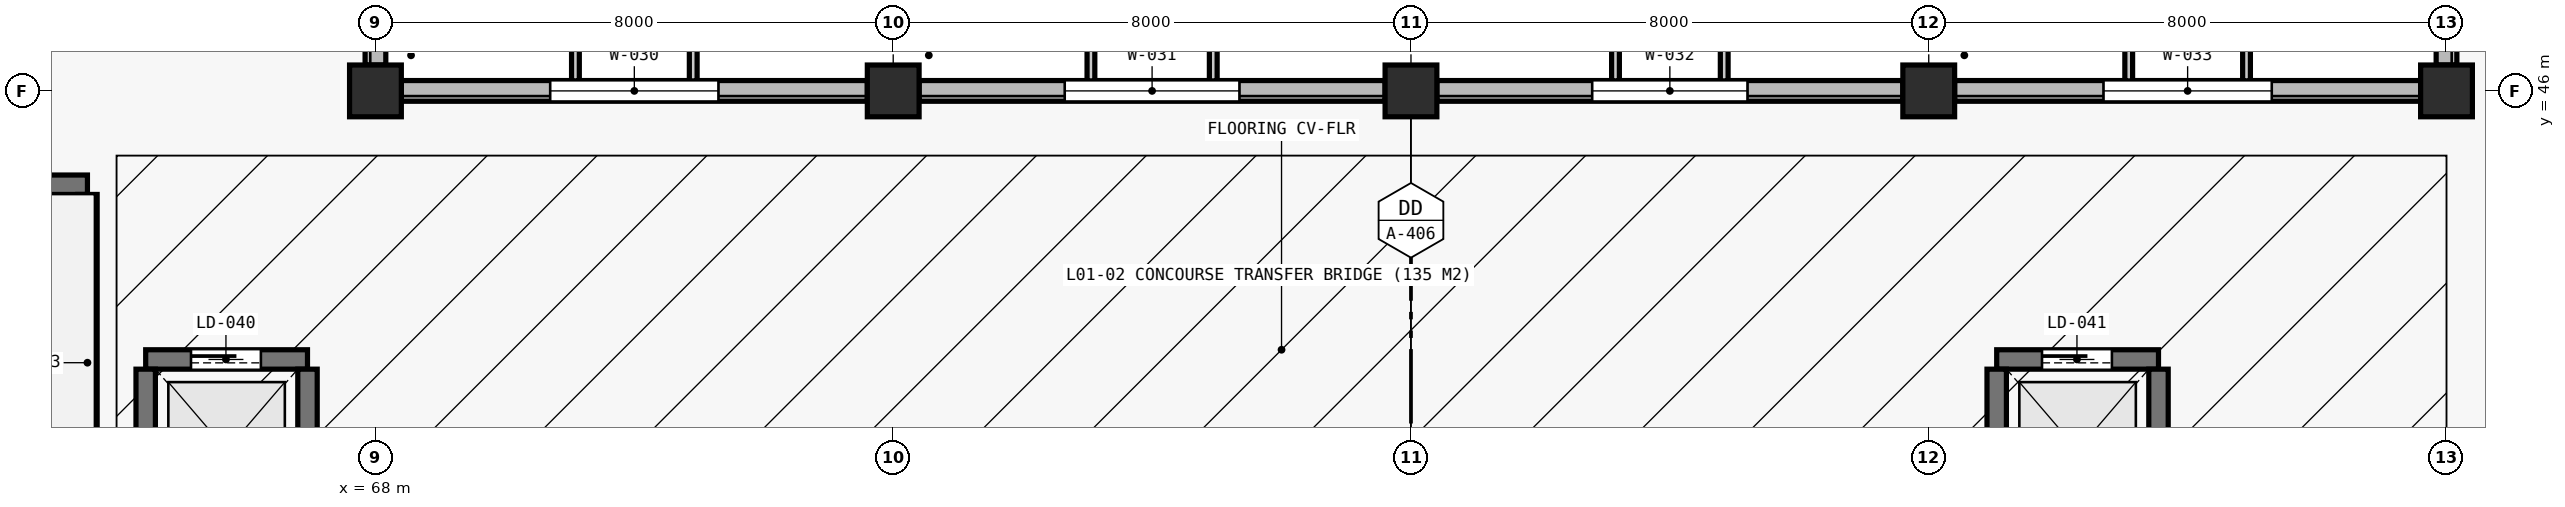
"""IFC4 building model, lengths in metres.
Left out: names, types, materials, properties, quantities, classifications, styles, units other than length and angle.
Written with IfcOpenShell. Run it as: python <this file> out.ifc"""

import sys

from ifc_helpers import new_model, si_unit, direction, frame, frame_2d, origin, origin_2d, place, context, subcontext, project, spatial, rectangle, extrude, element, fill, save


model = new_model("IFC4")
c1 = context("Model", 3, precision=1e-05, world=origin(), true_north=direction((0.0, 1.0)))
c2 = subcontext(c1, "Body", "Model", "MODEL_VIEW")
j1 = project(units=[si_unit("LENGTHUNIT", "METRE"), si_unit("PLANEANGLEUNIT", "RADIAN")], contexts=[c1])
p1 = place(None, origin())
s1 = spatial("IfcSite", under=j1, at=p1, CompositionType="ELEMENT")
p2 = place(p1, origin())
s2 = spatial("IfcBuilding", under=s1, at=p2, CompositionType="ELEMENT")
p3 = place(p2, frame((0.0, 0.0, 6.3)))
s3 = spatial("IfcBuildingStorey", under=s2, at=p3, CompositionType="ELEMENT", Elevation=6.3)
for number, where, z_axis, x_axis in (
    (1, (68.0, 46.0, 0.0), (0.0, 0.0, 1.0), (1.0, 0.0, 0.0)),
    (2, (76.0, 46.0, 0.0), (0.0, 0.0, 1.0), (1.0, 0.0, 0.0)),
    (3, (84.0, 46.0, 0.0), (0.0, 0.0, 1.0), (1.0, 0.0, 0.0)),
    (4, (92.0, 46.0, 0.0), (0.0, 0.0, 1.0), (1.0, 0.0, 0.0)),
    (5, (100.0, 46.0, 0.0), (0.0, 0.0, 1.0), (1.0, 0.0, 0.0)),
):
    element("IfcColumn", number, at=place(p3, frame(where, z_axis=z_axis, x_axis=x_axis)), inside=s3, PredefinedType="COLUMN", context=c2, shape_type="SweptSolid", body=[
        extrude(rectangle(XDim=0.8, YDim=0.8, at=origin_2d()), origin(), (0.0, 0.0, 1.0), 4.6),
    ])
p4 = place(p3, frame((53.05, 44.55, 0.0), z_axis=(0.0, 0.0, 1.0), x_axis=(1.0, 0.0, 0.0)))
e6 = element("IfcWall", 6, at=p4, inside=s3, PredefinedType="SHEAR", context=c2, shape_type="SweptSolid", body=[
    extrude(rectangle(XDim=10.5, YDim=0.3, at=frame_2d((5.25, 0.0))), origin(), (0.0, 0.0, 1.0), 4.6),
])
p5 = place(p4, frame((0.55, 0.0, 0.0)))
e7 = element("IfcOpeningElement", 7, at=p5, cuts=e6, PredefinedType="OPENING", context=c2, shape_type="SweptSolid", body=[
    extrude(rectangle(XDim=1.2, YDim=2.2, at=frame_2d((0.6, 1.1))), frame((0.0, 0.16, 0.0), z_axis=(0.0, -1.0, 0.0), x_axis=(1.0, 0.0, 0.0)), (0.0, 0.0, 1.0), 0.32),
])
p6 = place(p3, frame((63.55, 39.2, 0.0), z_axis=(0.0, 0.0, 1.0), x_axis=(0.0, 1.0, 0.0)))
e8 = element("IfcWall", 8, at=p6, inside=s3, PredefinedType="SHEAR", context=c2, shape_type="SweptSolid", body=[
    extrude(rectangle(XDim=5.2, YDim=0.3, at=frame_2d((2.6, 0.0))), origin(), (0.0, 0.0, 1.0), 4.6),
])
p7 = place(p3, frame((64.45, 41.85, 0.0), z_axis=(0.0, 0.0, 1.0), x_axis=(1.0, 0.0, 0.0)))
e9 = element("IfcWall", 9, at=p7, inside=s3, PredefinedType="SHEAR", context=c2, shape_type="SweptSolid", body=[
    extrude(rectangle(XDim=2.5, YDim=0.3, at=frame_2d((1.25, 0.0))), origin(), (0.0, 0.0, 1.0), 4.6),
])
p8 = place(p7, frame((0.7, 0.0, 0.0)))
e10 = element("IfcOpeningElement", 10, at=p8, cuts=e9, PredefinedType="OPENING", context=c2, shape_type="SweptSolid", body=[
    extrude(rectangle(XDim=1.08, YDim=2.2, at=frame_2d((0.54, 1.1))), frame((0.0, 0.16, 0.0), z_axis=(0.0, -1.0, 0.0), x_axis=(1.0, 0.0, 0.0)), (0.0, 0.0, 1.0), 0.32),
])
for number, where, z_axis, x_axis in (
    (11, (64.45, 39.2, 0.0), (0.0, 0.0, 1.0), (0.0, 1.0, 0.0)),
    (12, (66.95, 39.2, 0.0), (0.0, 0.0, 1.0), (0.0, 1.0, 0.0)),
):
    element("IfcWall", number, at=place(p3, frame(where, z_axis=z_axis, x_axis=x_axis)), inside=s3, PredefinedType="SHEAR", context=c2, shape_type="SweptSolid", body=[
        extrude(rectangle(XDim=2.5, YDim=0.3, at=frame_2d((1.25, 0.0))), origin(), (0.0, 0.0, 1.0), 4.6),
    ])
p9 = place(p3, frame((93.05, 41.85, 0.0), z_axis=(0.0, 0.0, 1.0), x_axis=(1.0, 0.0, 0.0)))
e13 = element("IfcWall", 13, at=p9, inside=s3, PredefinedType="SHEAR", context=c2, shape_type="SweptSolid", body=[
    extrude(rectangle(XDim=2.5, YDim=0.3, at=frame_2d((1.25, 0.0))), origin(), (0.0, 0.0, 1.0), 4.6),
])
p10 = place(p9, frame((0.7, 0.0, 0.0)))
e14 = element("IfcOpeningElement", 14, at=p10, cuts=e13, PredefinedType="OPENING", context=c2, shape_type="SweptSolid", body=[
    extrude(rectangle(XDim=1.08, YDim=2.2, at=frame_2d((0.54, 1.1))), frame((0.0, 0.16, 0.0), z_axis=(0.0, -1.0, 0.0), x_axis=(1.0, 0.0, 0.0)), (0.0, 0.0, 1.0), 0.32),
])
for number, where, z_axis, x_axis in (
    (15, (93.05, 39.2, 0.0), (0.0, 0.0, 1.0), (0.0, 1.0, 0.0)),
    (16, (95.55, 39.2, 0.0), (0.0, 0.0, 1.0), (0.0, 1.0, 0.0)),
):
    element("IfcWall", number, at=place(p3, frame(where, z_axis=z_axis, x_axis=x_axis)), inside=s3, PredefinedType="SHEAR", context=c2, shape_type="SweptSolid", body=[
        extrude(rectangle(XDim=2.5, YDim=0.3, at=frame_2d((1.25, 0.0))), origin(), (0.0, 0.0, 1.0), 4.6),
    ])
p11 = place(p3, frame((68.0, 53.6, 0.0), z_axis=(0.0, 0.0, 1.0), x_axis=(0.0, -1.0, 0.0)))
e17 = element("IfcWall", 17, at=p11, inside=s3, PredefinedType="STANDARD", context=c2, shape_type="SweptSolid", body=[
    extrude(rectangle(XDim=7.2, YDim=0.32, at=frame_2d((3.6, 0.0))), origin(), (0.0, 0.0, 1.0), 3.85),
])
p12 = place(p11, frame((2.4, 0.0, 0.95)))
e18 = element("IfcOpeningElement", 18, at=p12, cuts=e17, PredefinedType="OPENING", context=c2, shape_type="SweptSolid", body=[
    extrude(rectangle(XDim=2.4, YDim=1.8, at=frame_2d((1.2, 0.9))), frame((0.0, 0.17, 0.0), z_axis=(0.0, -1.0, 0.0), x_axis=(1.0, 0.0, 0.0)), (0.0, 0.0, 1.0), 0.34),
])
p13 = place(p3, frame((68.4, 46.0, 0.0), z_axis=(0.0, 0.0, 1.0), x_axis=(1.0, 0.0, 0.0)))
e19 = element("IfcWall", 19, at=p13, inside=s3, PredefinedType="STANDARD", context=c2, shape_type="SweptSolid", body=[
    extrude(rectangle(XDim=7.2, YDim=0.32, at=frame_2d((3.6, 0.0))), origin(), (0.0, 0.0, 1.0), 3.85),
])
p14 = place(p13, frame((2.3, 0.0, 0.95)))
e20 = element("IfcOpeningElement", 20, at=p14, cuts=e19, PredefinedType="OPENING", context=c2, shape_type="SweptSolid", body=[
    extrude(rectangle(XDim=2.6, YDim=1.4, at=frame_2d((1.3, 0.7))), frame((0.0, 0.17, 0.0), z_axis=(0.0, -1.0, 0.0), x_axis=(1.0, 0.0, 0.0)), (0.0, 0.0, 1.0), 0.34),
])
p15 = place(p3, frame((76.4, 46.0, 0.0), z_axis=(0.0, 0.0, 1.0), x_axis=(1.0, 0.0, 0.0)))
e21 = element("IfcWall", 21, at=p15, inside=s3, PredefinedType="STANDARD", context=c2, shape_type="SweptSolid", body=[
    extrude(rectangle(XDim=7.2, YDim=0.32, at=frame_2d((3.6, 0.0))), origin(), (0.0, 0.0, 1.0), 3.85),
])
p16 = place(p15, frame((2.25, 0.0, 0.95)))
e22 = element("IfcOpeningElement", 22, at=p16, cuts=e21, PredefinedType="OPENING", context=c2, shape_type="SweptSolid", body=[
    extrude(rectangle(XDim=2.7, YDim=1.95, at=frame_2d((1.35, 0.975))), frame((0.0, 0.17, 0.0), z_axis=(0.0, -1.0, 0.0), x_axis=(1.0, 0.0, 0.0)), (0.0, 0.0, 1.0), 0.34),
])
p17 = place(p3, frame((84.4, 46.0, 0.0), z_axis=(0.0, 0.0, 1.0), x_axis=(1.0, 0.0, 0.0)))
e23 = element("IfcWall", 23, at=p17, inside=s3, PredefinedType="STANDARD", context=c2, shape_type="SweptSolid", body=[
    extrude(rectangle(XDim=7.2, YDim=0.32, at=frame_2d((3.6, 0.0))), origin(), (0.0, 0.0, 1.0), 3.85),
])
p18 = place(p17, frame((2.4, 0.0, 0.95)))
e24 = element("IfcOpeningElement", 24, at=p18, cuts=e23, PredefinedType="OPENING", context=c2, shape_type="SweptSolid", body=[
    extrude(rectangle(XDim=2.4, YDim=1.8, at=frame_2d((1.2, 0.9))), frame((0.0, 0.17, 0.0), z_axis=(0.0, -1.0, 0.0), x_axis=(1.0, 0.0, 0.0)), (0.0, 0.0, 1.0), 0.34),
])
p19 = place(p3, frame((92.4, 46.0, 0.0), z_axis=(0.0, 0.0, 1.0), x_axis=(1.0, 0.0, 0.0)))
e25 = element("IfcWall", 25, at=p19, inside=s3, PredefinedType="STANDARD", context=c2, shape_type="SweptSolid", body=[
    extrude(rectangle(XDim=7.2, YDim=0.32, at=frame_2d((3.6, 0.0))), origin(), (0.0, 0.0, 1.0), 3.85),
])
p20 = place(p19, frame((2.3, 0.0, 0.95)))
e26 = element("IfcOpeningElement", 26, at=p20, cuts=e25, PredefinedType="OPENING", context=c2, shape_type="SweptSolid", body=[
    extrude(rectangle(XDim=2.6, YDim=1.4, at=frame_2d((1.3, 0.7))), frame((0.0, 0.17, 0.0), z_axis=(0.0, -1.0, 0.0), x_axis=(1.0, 0.0, 0.0)), (0.0, 0.0, 1.0), 0.34),
])
p21 = place(p3, frame((100.0, 46.4, 0.0), z_axis=(0.0, 0.0, 1.0), x_axis=(0.0, 1.0, 0.0)))
e27 = element("IfcWall", 27, at=p21, inside=s3, PredefinedType="STANDARD", context=c2, shape_type="SweptSolid", body=[
    extrude(rectangle(XDim=7.2, YDim=0.32, at=frame_2d((3.6, 0.0))), origin(), (0.0, 0.0, 1.0), 3.85),
])
p22 = place(p14, origin())
e28 = element("IfcWindow", 28, at=p22, inside=s3, PartitioningType="SINGLE_PANEL", PredefinedType="WINDOW", context=c2, shape_type="SweptSolid", body=[
    extrude(rectangle(XDim=2.6, YDim=1.4, at=frame_2d((1.3, 0.7))), frame((0.0, 0.03, 0.0), z_axis=(0.0, -1.0, 0.0), x_axis=(1.0, 0.0, 0.0)), (0.0, 0.0, 1.0), 0.06),
])
fill(e20, e28)
p23 = place(p16, origin())
e29 = element("IfcWindow", 29, at=p23, inside=s3, PartitioningType="SINGLE_PANEL", PredefinedType="WINDOW", context=c2, shape_type="SweptSolid", body=[
    extrude(rectangle(XDim=2.7, YDim=1.95, at=frame_2d((1.35, 0.975))), frame((0.0, 0.03, 0.0), z_axis=(0.0, -1.0, 0.0), x_axis=(1.0, 0.0, 0.0)), (0.0, 0.0, 1.0), 0.06),
])
fill(e22, e29)
p24 = place(p18, origin())
e30 = element("IfcWindow", 30, at=p24, inside=s3, PartitioningType="SINGLE_PANEL", PredefinedType="WINDOW", context=c2, shape_type="SweptSolid", body=[
    extrude(rectangle(XDim=2.4, YDim=1.8, at=frame_2d((1.2, 0.9))), frame((0.0, 0.03, 0.0), z_axis=(0.0, -1.0, 0.0), x_axis=(1.0, 0.0, 0.0)), (0.0, 0.0, 1.0), 0.06),
])
fill(e24, e30)
p25 = place(p20, origin())
e31 = element("IfcWindow", 31, at=p25, inside=s3, PartitioningType="SINGLE_PANEL", PredefinedType="WINDOW", context=c2, shape_type="SweptSolid", body=[
    extrude(rectangle(XDim=2.6, YDim=1.4, at=frame_2d((1.3, 0.7))), frame((0.0, 0.03, 0.0), z_axis=(0.0, -1.0, 0.0), x_axis=(1.0, 0.0, 0.0)), (0.0, 0.0, 1.0), 0.06),
])
fill(e26, e31)
p26 = place(p8, origin())
e32 = element("IfcDoor", 32, at=p26, inside=s3, OperationType="SLIDING_TO_LEFT", PredefinedType="DOOR", context=c2, shape_type="SweptSolid", body=[
    extrude(rectangle(XDim=1.08, YDim=2.2, at=frame_2d((0.54, 1.1))), frame((0.0, 0.025, 0.0), z_axis=(0.0, -1.0, 0.0), x_axis=(1.0, 0.0, 0.0)), (0.0, 0.0, 1.0), 0.05),
])
fill(e10, e32)
p27 = place(p10, origin())
e33 = element("IfcDoor", 33, at=p27, inside=s3, OperationType="SLIDING_TO_LEFT", PredefinedType="DOOR", context=c2, shape_type="SweptSolid", body=[
    extrude(rectangle(XDim=1.08, YDim=2.2, at=frame_2d((0.54, 1.1))), frame((0.0, 0.025, 0.0), z_axis=(0.0, -1.0, 0.0), x_axis=(1.0, 0.0, 0.0)), (0.0, 0.0, 1.0), 0.05),
])
fill(e14, e33)
save(model, sys.argv[1])
